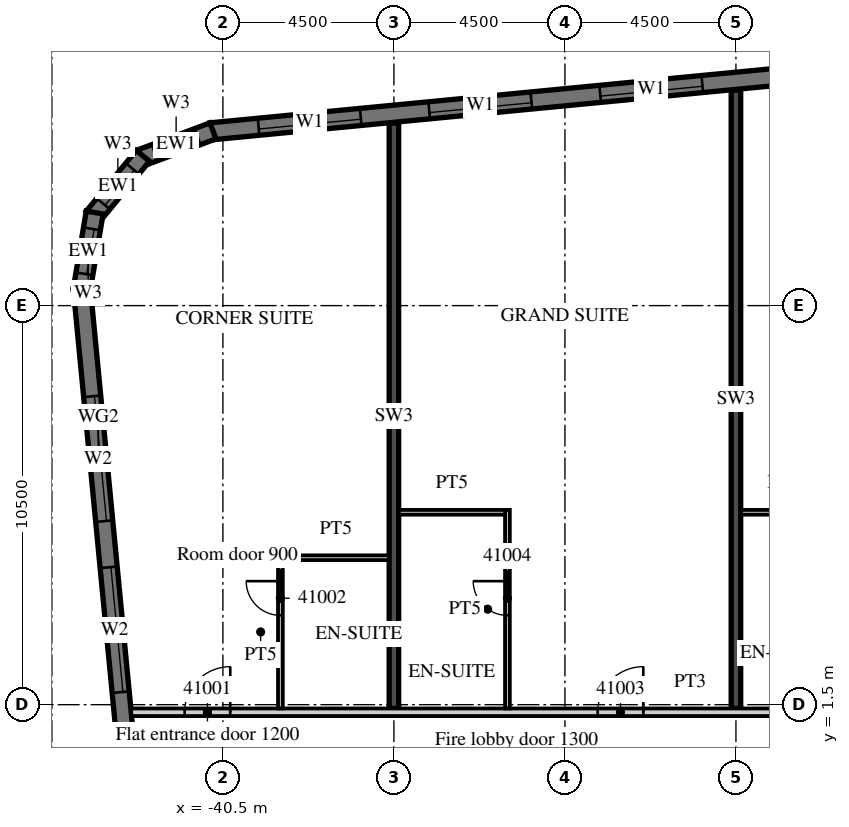
"""IFC4 building model, lengths in metres.
Left out: names, types, materials, properties, quantities, classifications, styles, units other than length and angle.
Written with IfcOpenShell. Run it as: python <this file> out.ifc"""

import sys

from ifc_helpers import new_model, si_unit, direction, frame, frame_2d, origin, place, context, subcontext, project, spatial, polyline, rectangle, outline, extrude, element, fill, save


model = new_model("IFC4")
c1 = context("Model", 3, precision=1e-05, world=origin(), true_north=direction((0.0, 1.0)))
c2 = subcontext(c1, "Body", "Model", "MODEL_VIEW")
j1 = project(units=[si_unit("LENGTHUNIT", "METRE"), si_unit("PLANEANGLEUNIT", "RADIAN")], contexts=[c1])
p1 = place(None, origin())
s1 = spatial("IfcSite", under=j1, at=p1, CompositionType="ELEMENT")
p2 = place(p1, origin())
s2 = spatial("IfcBuilding", under=s1, at=p2, CompositionType="ELEMENT")
p3 = place(p2, frame((0.0, 0.0, 176.8)))
s3 = spatial("IfcBuildingStorey", under=s2, at=p3, CompositionType="ELEMENT", Elevation=176.8)
p4 = place(p3, frame((-36.0, 1.4, 0.0), z_axis=(0.0, 0.0, 1.0), x_axis=(0.0, 1.0, 0.0)))
e1 = element("IfcWall", 1, at=p4, inside=s3, PredefinedType="SHEAR", context=c2, shape_type="SweptSolid", body=[
    extrude(rectangle(XDim=15.401, YDim=0.25, at=frame_2d((7.701, 0.0))), origin(), (0.0, 0.0, 1.0), 3.3),
])
p5 = place(p3, frame((-27.0, 1.4, 0.0), z_axis=(0.0, 0.0, 1.0), x_axis=(0.0, 1.0, 0.0)))
e2 = element("IfcWall", 2, at=p5, inside=s3, PredefinedType="SHEAR", context=c2, shape_type="SweptSolid", body=[
    extrude(rectangle(XDim=16.268, YDim=0.25, at=frame_2d((8.134, 0.0))), origin(), (0.0, 0.0, 1.0), 3.3),
])
p6 = place(p3, frame((-44.214, 12.466, 0.0), z_axis=(0.0, 0.0, 1.0), x_axis=(0.095847314626, -0.995396047952, 0.0)))
e3 = element("IfcWall", 3, at=p6, inside=s3, PredefinedType="SOLIDWALL", context=c2, shape_type="SweptSolid", body=[
    extrude(rectangle(XDim=34.0, YDim=0.45, at=frame_2d((17.0, 0.0))), origin(), (0.0, 0.0, 1.0), 3.02),
])
p7 = place(p6, frame((2.865, 0.0, 0.45)))
e4 = element("IfcOpeningElement", 4, at=p7, cuts=e3, PredefinedType="OPENING", context=c2, shape_type="SweptSolid", body=[
    extrude(rectangle(XDim=3.3, YDim=2.25, at=frame_2d((1.65, 1.125))), frame((0.0, 0.235, 0.0), z_axis=(0.0, -1.0, 0.0), x_axis=(1.0, 0.0, 0.0)), (0.0, 0.0, 1.0), 0.47),
])
p8 = place(p6, frame((7.386, 0.0, 0.45)))
e5 = element("IfcOpeningElement", 5, at=p8, cuts=e3, PredefinedType="OPENING", context=c2, shape_type="SweptSolid", body=[
    extrude(rectangle(XDim=3.3, YDim=2.25, at=frame_2d((1.65, 1.125))), frame((0.0, 0.235, 0.0), z_axis=(0.0, -1.0, 0.0), x_axis=(1.0, 0.0, 0.0)), (0.0, 0.0, 1.0), 0.47),
])
p9 = place(p3, frame((13.521, 21.817, 0.0), z_axis=(0.0, 0.0, 1.0), x_axis=(-0.995396508751, -0.095842529008, 0.0)))
e6 = element("IfcWall", 6, at=p9, inside=s3, PredefinedType="SOLIDWALL", context=c2, shape_type="SweptSolid", body=[
    extrude(rectangle(XDim=54.591, YDim=0.45, at=frame_2d((27.296, 0.0))), origin(), (0.0, 0.0, 1.0), 3.02),
])
p10 = place(p9, frame((0.91, 0.0, 0.45)))
e7 = element("IfcOpeningElement", 7, at=p10, cuts=e6, PredefinedType="OPENING", context=c2, shape_type="SweptSolid", body=[
    extrude(rectangle(XDim=2.7, YDim=2.25, at=frame_2d((1.35, 1.125))), frame((0.0, 0.235, 0.0), z_axis=(0.0, -1.0, 0.0), x_axis=(1.0, 0.0, 0.0)), (0.0, 0.0, 1.0), 0.47),
])
p11 = place(p9, frame((5.431, 0.0, 0.45)))
e8 = element("IfcOpeningElement", 8, at=p11, cuts=e6, PredefinedType="OPENING", context=c2, shape_type="SweptSolid", body=[
    extrude(rectangle(XDim=2.7, YDim=2.25, at=frame_2d((1.35, 1.125))), frame((0.0, 0.235, 0.0), z_axis=(0.0, -1.0, 0.0), x_axis=(1.0, 0.0, 0.0)), (0.0, 0.0, 1.0), 0.47),
])
p12 = place(p9, frame((9.952, 0.0, 0.45)))
e9 = element("IfcOpeningElement", 9, at=p12, cuts=e6, PredefinedType="OPENING", context=c2, shape_type="SweptSolid", body=[
    extrude(rectangle(XDim=2.7, YDim=2.25, at=frame_2d((1.35, 1.125))), frame((0.0, 0.235, 0.0), z_axis=(0.0, -1.0, 0.0), x_axis=(1.0, 0.0, 0.0)), (0.0, 0.0, 1.0), 0.47),
])
p13 = place(p9, frame((14.473, 0.0, 0.45)))
e10 = element("IfcOpeningElement", 10, at=p13, cuts=e6, PredefinedType="OPENING", context=c2, shape_type="SweptSolid", body=[
    extrude(rectangle(XDim=2.7, YDim=2.25, at=frame_2d((1.35, 1.125))), frame((0.0, 0.235, 0.0), z_axis=(0.0, -1.0, 0.0), x_axis=(1.0, 0.0, 0.0)), (0.0, 0.0, 1.0), 0.47),
])
p14 = place(p9, frame((18.994, 0.0, 0.45)))
e11 = element("IfcOpeningElement", 11, at=p14, cuts=e6, PredefinedType="OPENING", context=c2, shape_type="SweptSolid", body=[
    extrude(rectangle(XDim=2.7, YDim=2.25, at=frame_2d((1.35, 1.125))), frame((0.0, 0.235, 0.0), z_axis=(0.0, -1.0, 0.0), x_axis=(1.0, 0.0, 0.0)), (0.0, 0.0, 1.0), 0.47),
])
p15 = place(p9, frame((23.514, 0.0, 0.45)))
e12 = element("IfcOpeningElement", 12, at=p15, cuts=e6, PredefinedType="OPENING", context=c2, shape_type="SweptSolid", body=[
    extrude(rectangle(XDim=2.7, YDim=2.25, at=frame_2d((1.35, 1.125))), frame((0.0, 0.235, 0.0), z_axis=(0.0, -1.0, 0.0), x_axis=(1.0, 0.0, 0.0)), (0.0, 0.0, 1.0), 0.47),
])
p16 = place(p9, frame((28.035, 0.0, 0.45)))
e13 = element("IfcOpeningElement", 13, at=p16, cuts=e6, PredefinedType="OPENING", context=c2, shape_type="SweptSolid", body=[
    extrude(rectangle(XDim=2.7, YDim=2.25, at=frame_2d((1.35, 1.125))), frame((0.0, 0.235, 0.0), z_axis=(0.0, -1.0, 0.0), x_axis=(1.0, 0.0, 0.0)), (0.0, 0.0, 1.0), 0.47),
])
p17 = place(p9, frame((32.556, 0.0, 0.45)))
e14 = element("IfcOpeningElement", 14, at=p17, cuts=e6, PredefinedType="OPENING", context=c2, shape_type="SweptSolid", body=[
    extrude(rectangle(XDim=2.7, YDim=2.25, at=frame_2d((1.35, 1.125))), frame((0.0, 0.235, 0.0), z_axis=(0.0, -1.0, 0.0), x_axis=(1.0, 0.0, 0.0)), (0.0, 0.0, 1.0), 0.47),
])
p18 = place(p9, frame((37.077, 0.0, 0.45)))
e15 = element("IfcOpeningElement", 15, at=p18, cuts=e6, PredefinedType="OPENING", context=c2, shape_type="SweptSolid", body=[
    extrude(rectangle(XDim=2.7, YDim=2.25, at=frame_2d((1.35, 1.125))), frame((0.0, 0.235, 0.0), z_axis=(0.0, -1.0, 0.0), x_axis=(1.0, 0.0, 0.0)), (0.0, 0.0, 1.0), 0.47),
])
p19 = place(p9, frame((41.598, 0.0, 0.45)))
e16 = element("IfcOpeningElement", 16, at=p19, cuts=e6, PredefinedType="OPENING", context=c2, shape_type="SweptSolid", body=[
    extrude(rectangle(XDim=2.7, YDim=2.25, at=frame_2d((1.35, 1.125))), frame((0.0, 0.235, 0.0), z_axis=(0.0, -1.0, 0.0), x_axis=(1.0, 0.0, 0.0)), (0.0, 0.0, 1.0), 0.47),
])
p20 = place(p9, frame((46.118, 0.0, 0.45)))
e17 = element("IfcOpeningElement", 17, at=p20, cuts=e6, PredefinedType="OPENING", context=c2, shape_type="SweptSolid", body=[
    extrude(rectangle(XDim=2.7, YDim=2.25, at=frame_2d((1.35, 1.125))), frame((0.0, 0.235, 0.0), z_axis=(0.0, -1.0, 0.0), x_axis=(1.0, 0.0, 0.0)), (0.0, 0.0, 1.0), 0.47),
])
p21 = place(p9, frame((50.629, 0.0, 0.45)))
e18 = element("IfcOpeningElement", 18, at=p21, cuts=e6, PredefinedType="OPENING", context=c2, shape_type="SweptSolid", body=[
    extrude(rectangle(XDim=2.7, YDim=2.25, at=frame_2d((1.35, 1.125))), frame((0.0, 0.235, 0.0), z_axis=(0.0, -1.0, 0.0), x_axis=(1.0, 0.0, 0.0)), (0.0, 0.0, 1.0), 0.47),
])
p22 = place(p3, frame((-40.761, 16.598, 0.0), z_axis=(0.0, 0.0, 1.0), x_axis=(-0.936677599948, -0.350192909346, 0.0)))
e19 = element("IfcWall", 19, at=p22, inside=s3, PredefinedType="SOLIDWALL", context=c2, shape_type="SweptSolid", body=[
    extrude(outline(polyline([(0.0, -0.225), (2.071, -0.225), (1.95, 0.225), (0.121, 0.225), (0.0, -0.225)])), origin(), (0.0, 0.0, 1.0), 3.02),
])
p23 = place(p22, frame((0.435, 0.0, 0.45)))
e20 = element("IfcOpeningElement", 20, at=p23, cuts=e19, PredefinedType="OPENING", context=c2, shape_type="SweptSolid", body=[
    extrude(rectangle(XDim=1.2, YDim=2.25, at=frame_2d((0.6, 1.125))), frame((0.0, 0.235, 0.0), z_axis=(0.0, -1.0, 0.0), x_axis=(1.0, 0.0, 0.0)), (0.0, 0.0, 1.0), 0.47),
])
p24 = place(p3, frame((-42.606, 15.941, 0.0), z_axis=(0.0, 0.0, 1.0), x_axis=(-0.636116318187, -0.771593176315, 0.0)))
e21 = element("IfcWall", 21, at=p24, inside=s3, PredefinedType="SOLIDWALL", context=c2, shape_type="SweptSolid", body=[
    extrude(outline(polyline([(0.0, -0.225), (2.071, -0.225), (1.95, 0.225), (0.121, 0.225), (0.0, -0.225)])), origin(), (0.0, 0.0, 1.0), 3.02),
])
p25 = place(p24, frame((0.435, 0.0, 0.45)))
e22 = element("IfcOpeningElement", 22, at=p25, cuts=e21, PredefinedType="OPENING", context=c2, shape_type="SweptSolid", body=[
    extrude(rectangle(XDim=1.2, YDim=2.25, at=frame_2d((0.6, 1.125))), frame((0.0, 0.235, 0.0), z_axis=(0.0, -1.0, 0.0), x_axis=(1.0, 0.0, 0.0)), (0.0, 0.0, 1.0), 0.47),
])
p26 = place(p3, frame((-43.875, 14.449, 0.0), z_axis=(0.0, 0.0, 1.0), x_axis=(-0.164953448126, -0.986301353518, 0.0)))
e23 = element("IfcWall", 23, at=p26, inside=s3, PredefinedType="SOLIDWALL", context=c2, shape_type="SweptSolid", body=[
    extrude(outline(polyline([(0.0, -0.225), (2.071, -0.225), (1.95, 0.225), (0.121, 0.225), (0.0, -0.225)])), origin(), (0.0, 0.0, 1.0), 3.02),
])
p27 = place(p26, frame((0.435, 0.0, 0.45)))
e24 = element("IfcOpeningElement", 24, at=p27, cuts=e23, PredefinedType="OPENING", context=c2, shape_type="SweptSolid", body=[
    extrude(rectangle(XDim=1.2, YDim=2.25, at=frame_2d((0.6, 1.125))), frame((0.0, 0.235, 0.0), z_axis=(0.0, -1.0, 0.0), x_axis=(1.0, 0.0, 0.0)), (0.0, 0.0, 1.0), 0.47),
])
p28 = place(p3, frame((-42.913, 1.3, 0.0), z_axis=(0.0, 0.0, 1.0), x_axis=(1.0, 0.0, 0.0)))
e25 = element("IfcWall", 25, at=p28, inside=s3, PredefinedType="PARTITIONING", context=c2, shape_type="SweptSolid", body=[
    extrude(rectangle(XDim=29.413, YDim=0.2, at=frame_2d((14.707, 0.0))), origin(), (0.0, 0.0, 1.0), 3.02),
])
p29 = place(p28, frame((1.406, 0.0, 0.0)))
e26 = element("IfcOpeningElement", 26, at=p29, cuts=e25, PredefinedType="OPENING", context=c2, shape_type="SweptSolid", body=[
    extrude(rectangle(XDim=1.2, YDim=2.1, at=frame_2d((0.6, 1.05))), frame((0.0, 0.11, 0.0), z_axis=(0.0, -1.0, 0.0), x_axis=(1.0, 0.0, 0.0)), (0.0, 0.0, 1.0), 0.22),
])
p30 = place(p28, frame((12.275, 0.0, 0.0)))
e27 = element("IfcOpeningElement", 27, at=p30, cuts=e25, PredefinedType="OPENING", context=c2, shape_type="SweptSolid", body=[
    extrude(rectangle(XDim=1.2, YDim=2.1, at=frame_2d((0.6, 1.05))), frame((0.0, 0.11, 0.0), z_axis=(0.0, -1.0, 0.0), x_axis=(1.0, 0.0, 0.0)), (0.0, 0.0, 1.0), 0.22),
])
p31 = place(p28, frame((18.863, 0.0, 0.0)))
e28 = element("IfcOpeningElement", 28, at=p31, cuts=e25, PredefinedType="OPENING", context=c2, shape_type="SweptSolid", body=[
    extrude(rectangle(XDim=1.0, YDim=2.1, at=frame_2d((0.5, 1.05))), frame((0.0, 0.11, 0.0), z_axis=(0.0, -1.0, 0.0), x_axis=(1.0, 0.0, 0.0)), (0.0, 0.0, 1.0), 0.22),
])
p32 = place(p28, frame((23.338, 0.0, 0.0)))
e29 = element("IfcOpeningElement", 29, at=p32, cuts=e25, PredefinedType="OPENING", context=c2, shape_type="SweptSolid", body=[
    extrude(rectangle(XDim=1.0, YDim=2.1, at=frame_2d((0.5, 1.05))), frame((0.0, 0.11, 0.0), z_axis=(0.0, -1.0, 0.0), x_axis=(1.0, 0.0, 0.0)), (0.0, 0.0, 1.0), 0.22),
])
p33 = place(p28, frame((27.838, 0.0, 0.0)))
e30 = element("IfcOpeningElement", 30, at=p33, cuts=e25, PredefinedType="OPENING", context=c2, shape_type="SweptSolid", body=[
    extrude(rectangle(XDim=1.0, YDim=2.1, at=frame_2d((0.5, 1.05))), frame((0.0, 0.11, 0.0), z_axis=(0.0, -1.0, 0.0), x_axis=(1.0, 0.0, 0.0)), (0.0, 0.0, 1.0), 0.22),
])
p34 = place(p3, frame((-38.987, 1.4, 0.0), z_axis=(0.0, 0.0, 1.0), x_axis=(0.0, 1.0, 0.0)))
e31 = element("IfcWall", 31, at=p34, inside=s3, PredefinedType="PARTITIONING", context=c2, shape_type="SweptSolid", body=[
    extrude(rectangle(XDim=4.028, YDim=0.125, at=frame_2d((2.014, 0.0))), origin(), (0.0, 0.0, 1.0), 3.02),
])
p35 = place(p34, frame((2.45, 0.0, 0.0)))
e32 = element("IfcOpeningElement", 32, at=p35, cuts=e31, PredefinedType="OPENING", context=c2, shape_type="SweptSolid", body=[
    extrude(rectangle(XDim=0.9, YDim=2.1, at=frame_2d((0.45, 1.05))), frame((0.0, 0.073, 0.0), z_axis=(0.0, -1.0, 0.0), x_axis=(1.0, 0.0, 0.0)), (0.0, 0.0, 1.0), 0.145),
])
p36 = place(p3, frame((-38.925, 5.366, 0.0), z_axis=(0.0, 0.0, 1.0), x_axis=(1.0, 0.0, 0.0)))
e33 = element("IfcWall", 33, at=p36, inside=s3, PredefinedType="PARTITIONING", context=c2, shape_type="SweptSolid", body=[
    extrude(rectangle(XDim=2.8, YDim=0.125, at=frame_2d((1.4, 0.0))), origin(), (0.0, 0.0, 1.0), 3.02),
])
p37 = place(p3, frame((-33.013, 1.4, 0.0), z_axis=(0.0, 0.0, 1.0), x_axis=(0.0, 1.0, 0.0)))
e34 = element("IfcWall", 34, at=p37, inside=s3, PredefinedType="PARTITIONING", context=c2, shape_type="SweptSolid", body=[
    extrude(rectangle(XDim=5.225, YDim=0.125, at=frame_2d((2.613, 0.0))), origin(), (0.0, 0.0, 1.0), 3.02),
])
p38 = place(p37, frame((2.45, 0.0, 0.0)))
e35 = element("IfcOpeningElement", 35, at=p38, cuts=e34, PredefinedType="OPENING", context=c2, shape_type="SweptSolid", body=[
    extrude(rectangle(XDim=0.9, YDim=2.1, at=frame_2d((0.45, 1.05))), frame((0.0, 0.073, 0.0), z_axis=(0.0, -1.0, 0.0), x_axis=(1.0, 0.0, 0.0)), (0.0, 0.0, 1.0), 0.145),
])
p39 = place(p3, frame((-35.875, 6.562, 0.0), z_axis=(0.0, 0.0, 1.0), x_axis=(1.0, 0.0, 0.0)))
e36 = element("IfcWall", 36, at=p39, inside=s3, PredefinedType="PARTITIONING", context=c2, shape_type="SweptSolid", body=[
    extrude(rectangle(XDim=2.8, YDim=0.125, at=frame_2d((1.4, 0.0))), origin(), (0.0, 0.0, 1.0), 3.02),
])
p40 = place(p3, frame((-26.875, 6.562, 0.0), z_axis=(0.0, 0.0, 1.0), x_axis=(1.0, 0.0, 0.0)))
e37 = element("IfcWall", 37, at=p40, inside=s3, PredefinedType="PARTITIONING", context=c2, shape_type="SweptSolid", body=[
    extrude(rectangle(XDim=2.25, YDim=0.125, at=frame_2d((1.125, 0.0))), origin(), (0.0, 0.0, 1.0), 3.02),
])
p41 = place(p7, origin())
e38 = element("IfcWindow", 38, at=p41, inside=s3, PartitioningType="SINGLE_PANEL", PredefinedType="WINDOW", context=c2, shape_type="SweptSolid", body=[
    extrude(rectangle(XDim=3.3, YDim=2.25, at=frame_2d((1.65, 1.125))), frame((0.0, 0.09, 0.0), z_axis=(0.0, -1.0, 0.0), x_axis=(1.0, 0.0, 0.0)), (0.0, 0.0, 1.0), 0.06),
])
fill(e4, e38)
p42 = place(p8, origin())
e39 = element("IfcWindow", 39, at=p42, inside=s3, PartitioningType="SINGLE_PANEL", PredefinedType="WINDOW", context=c2, shape_type="SweptSolid", body=[
    extrude(rectangle(XDim=3.3, YDim=2.25, at=frame_2d((1.65, 1.125))), frame((0.0, 0.09, 0.0), z_axis=(0.0, -1.0, 0.0), x_axis=(1.0, 0.0, 0.0)), (0.0, 0.0, 1.0), 0.06),
])
fill(e5, e39)
p43 = place(p19, origin())
e40 = element("IfcWindow", 40, at=p43, inside=s3, PartitioningType="SINGLE_PANEL", PredefinedType="WINDOW", context=c2, shape_type="SweptSolid", body=[
    extrude(rectangle(XDim=2.7, YDim=2.25, at=frame_2d((1.35, 1.125))), frame((0.0, 0.09, 0.0), z_axis=(0.0, -1.0, 0.0), x_axis=(1.0, 0.0, 0.0)), (0.0, 0.0, 1.0), 0.06),
])
fill(e16, e40)
p44 = place(p20, origin())
e41 = element("IfcWindow", 41, at=p44, inside=s3, PartitioningType="SINGLE_PANEL", PredefinedType="WINDOW", context=c2, shape_type="SweptSolid", body=[
    extrude(rectangle(XDim=2.7, YDim=2.25, at=frame_2d((1.35, 1.125))), frame((0.0, 0.09, 0.0), z_axis=(0.0, -1.0, 0.0), x_axis=(1.0, 0.0, 0.0)), (0.0, 0.0, 1.0), 0.06),
])
fill(e17, e41)
p45 = place(p21, origin())
e42 = element("IfcWindow", 42, at=p45, inside=s3, PartitioningType="SINGLE_PANEL", PredefinedType="WINDOW", context=c2, shape_type="SweptSolid", body=[
    extrude(rectangle(XDim=2.7, YDim=2.25, at=frame_2d((1.35, 1.125))), frame((0.0, 0.09, 0.0), z_axis=(0.0, -1.0, 0.0), x_axis=(1.0, 0.0, 0.0)), (0.0, 0.0, 1.0), 0.06),
])
fill(e18, e42)
p46 = place(p23, origin())
e43 = element("IfcWindow", 43, at=p46, inside=s3, PartitioningType="SINGLE_PANEL", PredefinedType="WINDOW", context=c2, shape_type="SweptSolid", body=[
    extrude(rectangle(XDim=1.2, YDim=2.25, at=frame_2d((0.6, 1.125))), frame((0.0, 0.09, 0.0), z_axis=(0.0, -1.0, 0.0), x_axis=(1.0, 0.0, 0.0)), (0.0, 0.0, 1.0), 0.06),
])
fill(e20, e43)
p47 = place(p25, origin())
e44 = element("IfcWindow", 44, at=p47, inside=s3, PartitioningType="SINGLE_PANEL", PredefinedType="WINDOW", context=c2, shape_type="SweptSolid", body=[
    extrude(rectangle(XDim=1.2, YDim=2.25, at=frame_2d((0.6, 1.125))), frame((0.0, 0.09, 0.0), z_axis=(0.0, -1.0, 0.0), x_axis=(1.0, 0.0, 0.0)), (0.0, 0.0, 1.0), 0.06),
])
fill(e22, e44)
p48 = place(p27, origin())
e45 = element("IfcWindow", 45, at=p48, inside=s3, PartitioningType="SINGLE_PANEL", PredefinedType="WINDOW", context=c2, shape_type="SweptSolid", body=[
    extrude(rectangle(XDim=1.2, YDim=2.25, at=frame_2d((0.6, 1.125))), frame((0.0, 0.09, 0.0), z_axis=(0.0, -1.0, 0.0), x_axis=(1.0, 0.0, 0.0)), (0.0, 0.0, 1.0), 0.06),
])
fill(e24, e45)
p49 = place(p29, origin())
e46 = element("IfcDoor", 46, at=p49, inside=s3, OperationType="SINGLE_SWING_RIGHT", PredefinedType="DOOR", context=c2, shape_type="SweptSolid", body=[
    extrude(rectangle(XDim=1.2, YDim=2.1, at=frame_2d((0.6, 1.05))), frame((0.0, 0.025, 0.0), z_axis=(0.0, -1.0, 0.0), x_axis=(1.0, 0.0, 0.0)), (0.0, 0.0, 1.0), 0.05),
])
fill(e26, e46)
p50 = place(p35, origin())
e47 = element("IfcDoor", 47, at=p50, inside=s3, OperationType="SINGLE_SWING_RIGHT", PredefinedType="DOOR", context=c2, shape_type="SweptSolid", body=[
    extrude(rectangle(XDim=0.9, YDim=2.1, at=frame_2d((0.45, 1.05))), frame((0.0, 0.025, 0.0), z_axis=(0.0, -1.0, 0.0), x_axis=(1.0, 0.0, 0.0)), (0.0, 0.0, 1.0), 0.05),
])
fill(e32, e47)
p51 = place(p30, origin())
e48 = element("IfcDoor", 48, at=p51, inside=s3, OperationType="SINGLE_SWING_RIGHT", PredefinedType="DOOR", context=c2, shape_type="SweptSolid", body=[
    extrude(rectangle(XDim=1.2, YDim=2.1, at=frame_2d((0.6, 1.05))), frame((0.0, 0.025, 0.0), z_axis=(0.0, -1.0, 0.0), x_axis=(1.0, 0.0, 0.0)), (0.0, 0.0, 1.0), 0.05),
])
fill(e27, e48)
p52 = place(p38, origin())
e49 = element("IfcDoor", 49, at=p52, inside=s3, OperationType="SINGLE_SWING_RIGHT", PredefinedType="DOOR", context=c2, shape_type="SweptSolid", body=[
    extrude(rectangle(XDim=0.9, YDim=2.1, at=frame_2d((0.45, 1.05))), frame((0.0, 0.025, 0.0), z_axis=(0.0, -1.0, 0.0), x_axis=(1.0, 0.0, 0.0)), (0.0, 0.0, 1.0), 0.05),
])
fill(e35, e49)
save(model, sys.argv[1])
